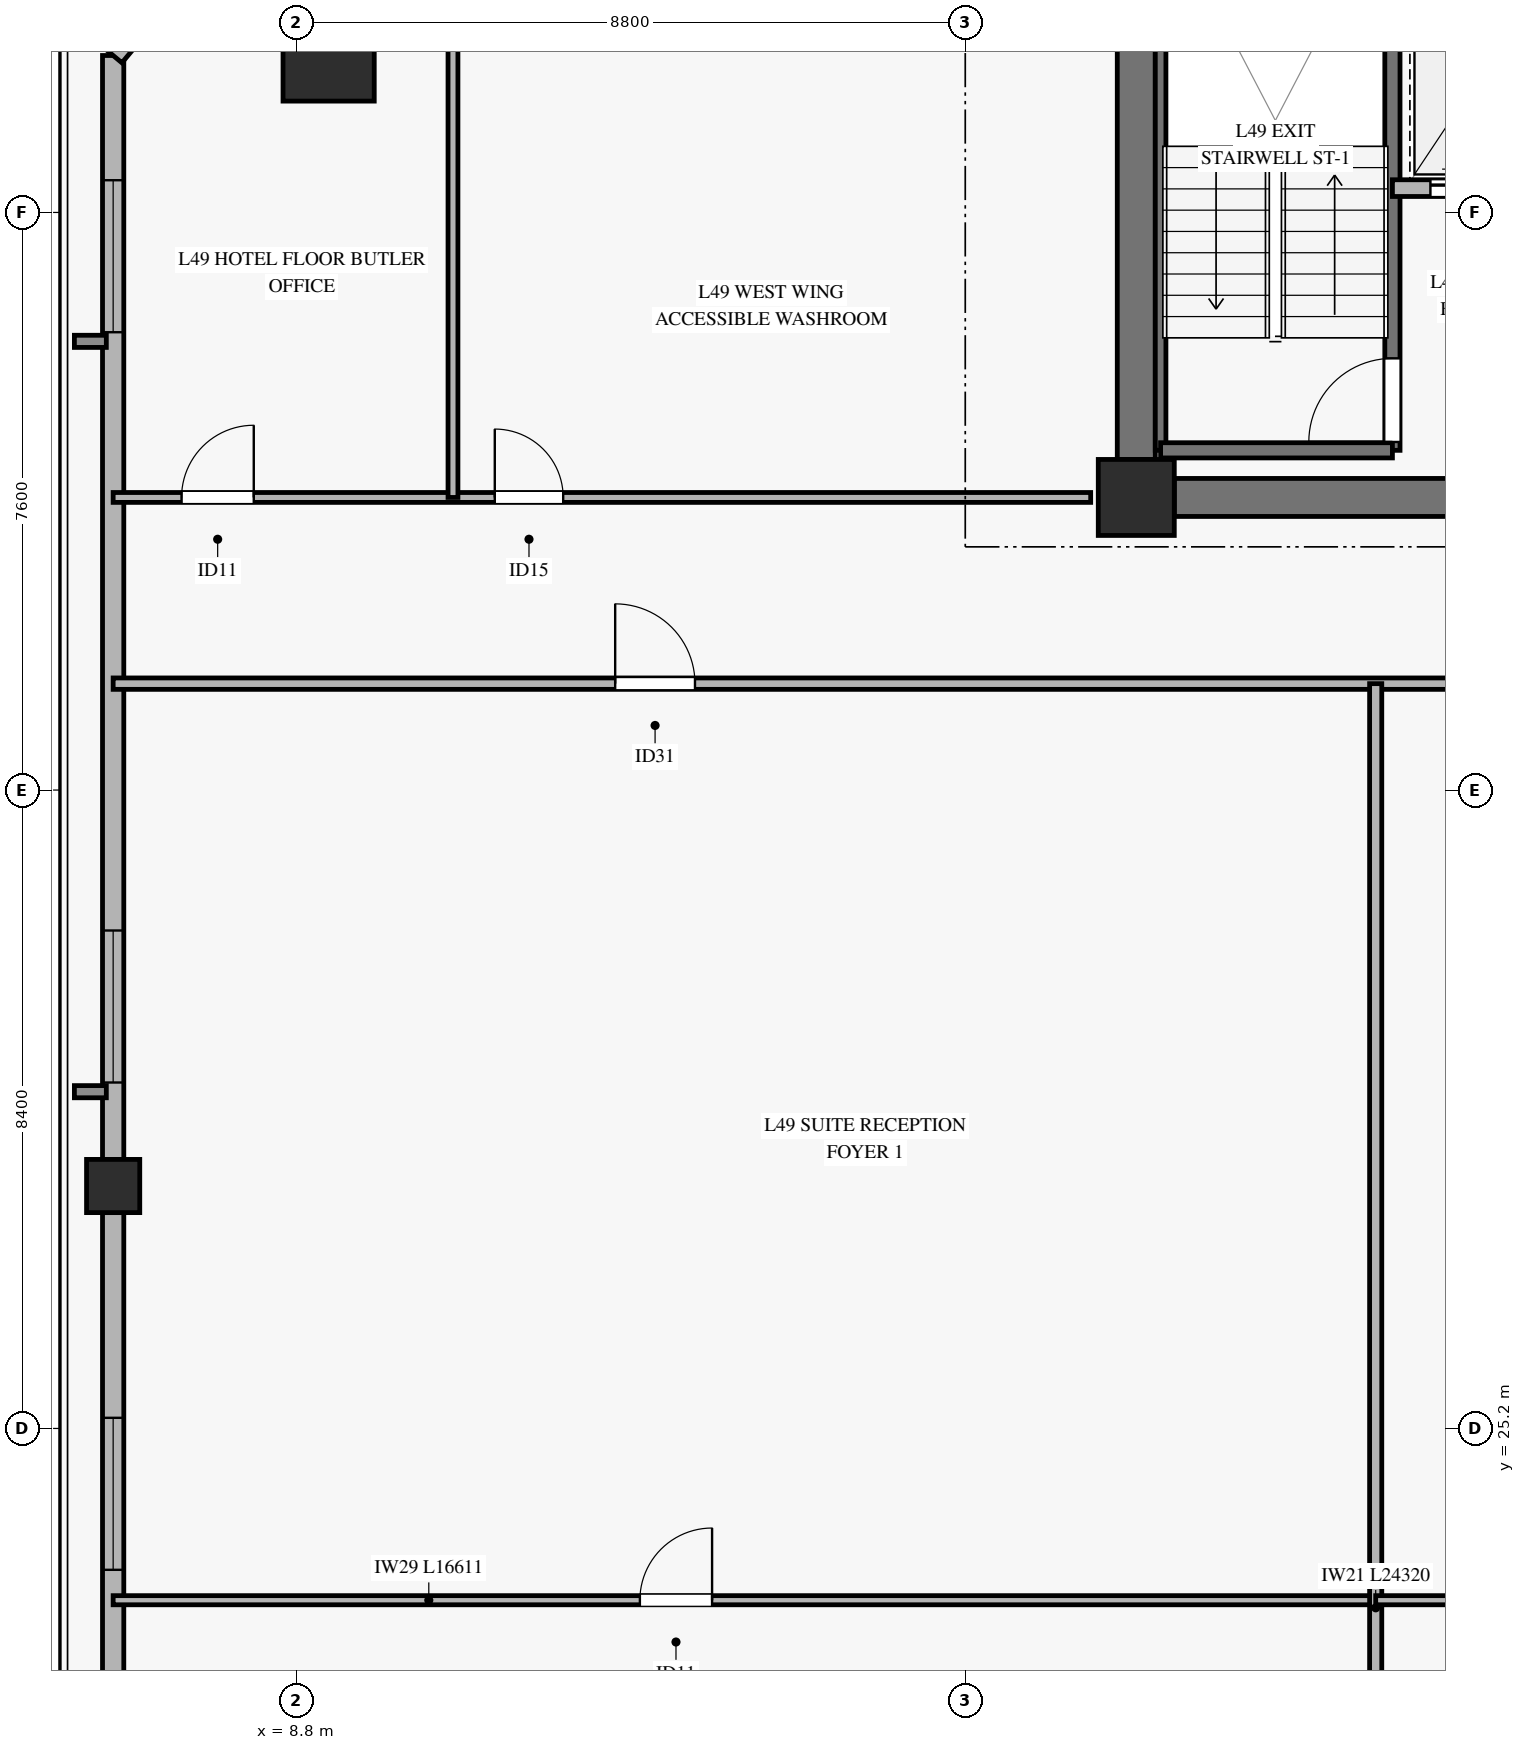
"""IFC4 building model, lengths in metres.
Left out: names, types, materials, properties, quantities, classifications, styles, units other than length and angle.
Written with IfcOpenShell. Run it as: python <this file> out.ifc"""

import sys

from ifc_helpers import new_model, si_unit, direction, frame, frame_2d, origin, origin_2d, place, context, subcontext, project, spatial, rectangle, hollow_rectangle, extrude, source, transform, mapped, element, fill, save


model = new_model("IFC4")
c1 = context("Model", 3, precision=1e-05, world=origin(), true_north=direction((0.0, 1.0)))
c2 = subcontext(c1, "Body", "Model", "MODEL_VIEW")
j1 = project(units=[si_unit("LENGTHUNIT", "METRE"), si_unit("PLANEANGLEUNIT", "RADIAN")], contexts=[c1])
p1 = place(None, origin())
s1 = spatial("IfcSite", under=j1, at=p1, CompositionType="ELEMENT")
p2 = place(p1, origin())
s2 = spatial("IfcBuilding", under=s1, at=p2, CompositionType="ELEMENT")
p3 = place(p2, frame((0.0, 0.0, 195.7)))
s3 = spatial("IfcBuildingStorey", under=s2, at=p3, CompositionType="ELEMENT", Elevation=195.7)
m1 = source(origin(), c2, "Body", "SweptSolid", [
    extrude(rectangle(XDim=1.0, YDim=1.0, at=origin_2d()), origin(), (0.0, 0.0, 1.0), 3.27),
])
p4 = place(p3, frame((19.85, 37.45, 0.0), z_axis=(0.0, 0.0, 1.0), x_axis=(1.0, 0.0, 0.0)))
e1 = element("IfcColumn", 1, at=p4, inside=s3, PredefinedType="PILASTER", context=c2, shape_type="MappedRepresentation", body=[
    mapped(m1, transform((0.0, 0.0, 0.0), x_axis=(1.0, 0.0, 0.0), y_axis=(0.0, 1.0, 0.0), z_axis=(0.0, 0.0, 1.0), scale=1.0)),
])
p5 = place(p3, frame((20.35, 37.45, 0.0), z_axis=(0.0, 0.0, 1.0), x_axis=(1.0, 0.0, 0.0)))
e2 = element("IfcWall", 2, at=p5, inside=s3, PredefinedType="SHEAR", context=c2, shape_type="SweptSolid", body=[
    extrude(rectangle(XDim=9.95, YDim=0.5, at=frame_2d((4.975, 0.0))), origin(), (0.0, 0.0, 1.0), 3.27),
])
p6 = place(p5, frame((4.2, 0.0, 0.0)))
e3 = element("IfcOpeningElement", 3, at=p6, cuts=e2, PredefinedType="OPENING", context=c2, shape_type="SweptSolid", body=[
    extrude(rectangle(XDim=1.2, YDim=2.15, at=frame_2d((0.6, 1.075))), frame((0.0, 0.26, 0.0), z_axis=(0.0, -1.0, 0.0), x_axis=(1.0, 0.0, 0.0)), (0.0, 0.0, 1.0), 0.52),
])
p7 = place(p3, frame((19.85, 37.95, 0.0), z_axis=(0.0, 0.0, 1.0), x_axis=(0.0, 1.0, 0.0)))
e4 = element("IfcWall", 4, at=p7, inside=s3, PredefinedType="SHEAR", context=c2, shape_type="SweptSolid", body=[
    extrude(rectangle(XDim=8.1, YDim=0.5, at=frame_2d((4.05, 0.0))), origin(), (0.0, 0.0, 1.0), 3.27),
])
m2 = source(origin(), c2, "Body", "SweptSolid", [
    extrude(hollow_rectangle(XDim=1.2, YDim=1.2, WallThickness=0.055, at=origin_2d()), origin(), (0.0, 0.0, 1.0), 3.27),
])
p8 = place(p3, frame((9.224, 43.265, 0.0), z_axis=(0.0, 0.0, 1.0), x_axis=(1.0, 0.0, 0.0)))
e5 = element("IfcColumn", 5, at=p8, inside=s3, PredefinedType="COLUMN", context=c2, shape_type="MappedRepresentation", body=[
    mapped(m2, transform((0.0, 0.0, 0.0), x_axis=(1.0, 0.0, 0.0), y_axis=(0.0, 1.0, 0.0), z_axis=(0.0, 0.0, 1.0), scale=1.0)),
])
m3 = source(origin(), c2, "Body", "SweptSolid", [
    extrude(hollow_rectangle(XDim=0.7, YDim=0.7, WallThickness=0.032, at=origin_2d()), origin(), (0.0, 0.0, 1.0), 3.27),
])
p9 = place(p3, frame((6.389, 28.39, 0.0), z_axis=(0.0, 0.0, 1.0), x_axis=(1.0, 0.0, 0.0)))
e6 = element("IfcColumn", 6, at=p9, inside=s3, PredefinedType="COLUMN", context=c2, shape_type="MappedRepresentation", body=[
    mapped(m3, transform((0.0, 0.0, 0.0), x_axis=(1.0, 0.0, 0.0), y_axis=(0.0, 1.0, 0.0), z_axis=(0.0, 0.0, 1.0), scale=1.0)),
])
p10 = place(p3, frame((6.389, 13.515, 0.0), z_axis=(0.0, 0.0, 1.0), x_axis=(0.0, 1.0, 0.0)))
e7 = element("IfcWall", 7, at=p10, inside=s3, PredefinedType="SOLIDWALL", context=c2, shape_type="SweptSolid", body=[
    extrude(rectangle(XDim=14.525, YDim=0.28, at=frame_2d((7.263, 0.0))), origin(), (0.0, 0.0, 1.0), 2.75),
])
p11 = place(p10, frame((3.017, 0.0, 0.45)))
e8 = element("IfcOpeningElement", 8, at=p11, cuts=e7, PredefinedType="OPENING", context=c2, shape_type="SweptSolid", body=[
    extrude(rectangle(XDim=2.0, YDim=2.0, at=frame_2d((1.0, 1.0))), frame((0.0, 0.15, 0.0), z_axis=(0.0, -1.0, 0.0), x_axis=(1.0, 0.0, 0.0)), (0.0, 0.0, 1.0), 0.3),
])
p12 = place(p10, frame((9.825, 0.0, 0.45)))
e9 = element("IfcOpeningElement", 9, at=p12, cuts=e7, PredefinedType="OPENING", context=c2, shape_type="SweptSolid", body=[
    extrude(rectangle(XDim=2.0, YDim=2.0, at=frame_2d((1.0, 1.0))), frame((0.0, 0.15, 0.0), z_axis=(0.0, -1.0, 0.0), x_axis=(1.0, 0.0, 0.0)), (0.0, 0.0, 1.0), 0.3),
])
p13 = place(p3, frame((6.389, 28.74, 0.0), z_axis=(0.0, 0.0, 1.0), x_axis=(0.0, 1.0, 0.0)))
e10 = element("IfcWall", 10, at=p13, inside=s3, PredefinedType="SOLIDWALL", context=c2, shape_type="SweptSolid", body=[
    extrude(rectangle(XDim=14.525, YDim=0.28, at=frame_2d((7.262, 0.0))), origin(), (0.0, 0.0, 1.0), 2.75),
])
p14 = place(p13, frame((1.012, 0.0, 0.45)))
e11 = element("IfcOpeningElement", 11, at=p14, cuts=e10, PredefinedType="OPENING", context=c2, shape_type="SweptSolid", body=[
    extrude(rectangle(XDim=2.0, YDim=2.0, at=frame_2d((1.0, 1.0))), frame((0.0, 0.15, 0.0), z_axis=(0.0, -1.0, 0.0), x_axis=(1.0, 0.0, 0.0)), (0.0, 0.0, 1.0), 0.3),
])
p15 = place(p13, frame((10.884, 0.0, 0.45)))
e12 = element("IfcOpeningElement", 12, at=p15, cuts=e10, PredefinedType="OPENING", context=c2, shape_type="SweptSolid", body=[
    extrude(rectangle(XDim=2.0, YDim=2.0, at=frame_2d((1.0, 1.0))), frame((0.0, 0.15, 0.0), z_axis=(0.0, -1.0, 0.0), x_axis=(1.0, 0.0, 0.0)), (0.0, 0.0, 1.0), 0.3),
])
p16 = place(p3, frame((8.874, 46.25, 0.0), z_axis=(0.0, 0.0, 1.0), x_axis=(-0.639807188901, -0.768535465044, 0.0)))
e13 = element("IfcWall", 13, at=p16, inside=s3, PredefinedType="SOLIDWALL", context=c2, shape_type="SweptSolid", body=[
    extrude(rectangle(XDim=3.884, YDim=0.3, at=frame_2d((1.942, 0.0))), origin(), (0.0, 0.0, 1.0), 2.75),
])
p17 = place(p16, frame((1.142, 0.0, 0.45)))
e14 = element("IfcOpeningElement", 14, at=p17, cuts=e13, PredefinedType="OPENING", context=c2, shape_type="SweptSolid", body=[
    extrude(rectangle(XDim=1.6, YDim=2.0, at=frame_2d((0.8, 1.0))), frame((0.0, 0.16, 0.0), z_axis=(0.0, -1.0, 0.0), x_axis=(1.0, 0.0, 0.0)), (0.0, 0.0, 1.0), 0.32),
])
p18 = place(p3, frame((20.17, 38.07, 0.0), z_axis=(0.0, 0.0, 1.0), x_axis=(0.0, 1.0, 0.0)))
e15 = element("IfcWall", 15, at=p18, inside=s3, PredefinedType="SOLIDWALL", context=c2, shape_type="SweptSolid", body=[
    extrude(rectangle(XDim=7.25, YDim=0.14, at=frame_2d((3.625, 0.0))), origin(), (0.0, 0.0, 1.0), 3.5),
])
p19 = place(p3, frame((23.22, 38.07, 0.0), z_axis=(0.0, 0.0, 1.0), x_axis=(0.0, 1.0, 0.0)))
e16 = element("IfcWall", 16, at=p19, inside=s3, PredefinedType="SOLIDWALL", context=c2, shape_type="SweptSolid", body=[
    extrude(rectangle(XDim=7.25, YDim=0.2, at=frame_2d((3.625, 0.0))), origin(), (0.0, 0.0, 1.0), 3.5),
])
p20 = place(p19, frame((0.11, 0.0, 0.0)))
e17 = element("IfcOpeningElement", 17, at=p20, cuts=e16, PredefinedType="OPENING", context=c2, shape_type="SweptSolid", body=[
    extrude(rectangle(XDim=1.1, YDim=2.15, at=frame_2d((0.55, 1.075))), frame((0.0, 0.11, 0.0), z_axis=(0.0, -1.0, 0.0), x_axis=(1.0, 0.0, 0.0)), (0.0, 0.0, 1.0), 0.22),
])
p21 = place(p3, frame((20.17, 38.07, 0.0), z_axis=(0.0, 0.0, 1.0), x_axis=(1.0, 0.0, 0.0)))
e18 = element("IfcWall", 18, at=p21, inside=s3, PredefinedType="SOLIDWALL", context=c2, shape_type="SweptSolid", body=[
    extrude(rectangle(XDim=3.05, YDim=0.2, at=frame_2d((1.525, 0.0))), origin(), (0.0, 0.0, 1.0), 3.5),
])
p22 = place(p3, frame((23.22, 41.52, 0.0), z_axis=(0.0, 0.0, 1.0), x_axis=(1.0, 0.0, 0.0)))
e19 = element("IfcWall", 19, at=p22, inside=s3, PredefinedType="SOLIDWALL", context=c2, shape_type="SweptSolid", body=[
    extrude(rectangle(XDim=3.92, YDim=0.22, at=frame_2d((1.96, 0.0))), origin(), (0.0, 0.0, 1.0), 3.27),
])
p23 = place(p22, frame((0.5, 0.0, 0.0)))
e20 = element("IfcOpeningElement", 20, at=p23, cuts=e19, PredefinedType="OPENING", context=c2, shape_type="SweptSolid", body=[
    extrude(rectangle(XDim=1.1, YDim=2.2, at=frame_2d((0.55, 1.1))), frame((0.0, 0.12, 0.0), z_axis=(0.0, -1.0, 0.0), x_axis=(1.0, 0.0, 0.0)), (0.0, 0.0, 1.0), 0.24),
])
p24 = place(p22, frame((2.4, 0.0, 0.0)))
e21 = element("IfcOpeningElement", 21, at=p24, cuts=e19, PredefinedType="OPENING", context=c2, shape_type="SweptSolid", body=[
    extrude(rectangle(XDim=1.1, YDim=2.2, at=frame_2d((0.55, 1.1))), frame((0.0, 0.12, 0.0), z_axis=(0.0, -1.0, 0.0), x_axis=(1.0, 0.0, 0.0)), (0.0, 0.0, 1.0), 0.24),
])
p25 = place(p3, frame((6.389, 35.0, 0.0), z_axis=(0.0, 0.0, 1.0), x_axis=(1.0, 0.0, 0.0)))
e22 = element("IfcWall", 22, at=p25, inside=s3, PredefinedType="PARTITIONING", context=c2, shape_type="SweptSolid", body=[
    extrude(rectangle(XDim=57.623, YDim=0.15, at=frame_2d((28.812, 0.0))), origin(), (0.0, 0.0, 1.0), 2.455),
])
p26 = place(p25, frame((6.605, 0.0, 0.0)))
e23 = element("IfcOpeningElement", 23, at=p26, cuts=e22, PredefinedType="OPENING", context=c2, shape_type="SweptSolid", body=[
    extrude(rectangle(XDim=1.05, YDim=2.15, at=frame_2d((0.525, 1.075))), frame((0.0, 0.085, 0.0), z_axis=(0.0, -1.0, 0.0), x_axis=(1.0, 0.0, 0.0)), (0.0, 0.0, 1.0), 0.17),
])
p27 = place(p25, frame((19.288, 0.0, 0.0)))
e24 = element("IfcOpeningElement", 24, at=p27, cuts=e22, PredefinedType="OPENING", context=c2, shape_type="SweptSolid", body=[
    extrude(rectangle(XDim=1.05, YDim=2.15, at=frame_2d((0.525, 1.075))), frame((0.0, 0.085, 0.0), z_axis=(0.0, -1.0, 0.0), x_axis=(1.0, 0.0, 0.0)), (0.0, 0.0, 1.0), 0.17),
])
p28 = place(p25, frame((25.888, 0.0, 0.0)))
e25 = element("IfcOpeningElement", 25, at=p28, cuts=e22, PredefinedType="OPENING", context=c2, shape_type="SweptSolid", body=[
    extrude(rectangle(XDim=1.05, YDim=2.15, at=frame_2d((0.525, 1.075))), frame((0.0, 0.085, 0.0), z_axis=(0.0, -1.0, 0.0), x_axis=(1.0, 0.0, 0.0)), (0.0, 0.0, 1.0), 0.17),
])
p29 = place(p25, frame((32.381, 0.0, 0.0)))
e26 = element("IfcOpeningElement", 26, at=p29, cuts=e22, PredefinedType="OPENING", context=c2, shape_type="SweptSolid", body=[
    extrude(rectangle(XDim=1.05, YDim=2.15, at=frame_2d((0.525, 1.075))), frame((0.0, 0.085, 0.0), z_axis=(0.0, -1.0, 0.0), x_axis=(1.0, 0.0, 0.0)), (0.0, 0.0, 1.0), 0.17),
])
p30 = place(p25, frame((44.565, 0.0, 0.0)))
e27 = element("IfcOpeningElement", 27, at=p30, cuts=e22, PredefinedType="OPENING", context=c2, shape_type="SweptSolid", body=[
    extrude(rectangle(XDim=1.05, YDim=2.15, at=frame_2d((0.525, 1.075))), frame((0.0, 0.085, 0.0), z_axis=(0.0, -1.0, 0.0), x_axis=(1.0, 0.0, 0.0)), (0.0, 0.0, 1.0), 0.17),
])
p31 = place(p3, frame((6.389, 22.94, 0.0), z_axis=(0.0, 0.0, 1.0), x_axis=(1.0, 0.0, 0.0)))
e28 = element("IfcWall", 28, at=p31, inside=s3, PredefinedType="PARTITIONING", context=c2, shape_type="SweptSolid", body=[
    extrude(rectangle(XDim=16.611, YDim=0.12, at=frame_2d((8.306, 0.0))), origin(), (0.0, 0.0, 1.0), 2.455),
])
p32 = place(p31, frame((6.93, 0.0, 0.0)))
e29 = element("IfcOpeningElement", 29, at=p32, cuts=e28, PredefinedType="OPENING", context=c2, shape_type="SweptSolid", body=[
    extrude(rectangle(XDim=0.95, YDim=2.1, at=frame_2d((0.475, 1.05))), frame((0.0, 0.07, 0.0), z_axis=(0.0, -1.0, 0.0), x_axis=(1.0, 0.0, 0.0)), (0.0, 0.0, 1.0), 0.14),
])
p33 = place(p3, frame((23.0, 10.68, 0.0), z_axis=(0.0, 0.0, 1.0), x_axis=(0.0, 1.0, 0.0)))
e30 = element("IfcWall", 30, at=p33, inside=s3, PredefinedType="PARTITIONING", context=c2, shape_type="SweptSolid", body=[
    extrude(rectangle(XDim=24.32, YDim=0.16, at=frame_2d((12.16, 0.0))), origin(), (0.0, 0.0, 1.0), 2.755),
])
p34 = place(p3, frame((23.0, 22.94, 0.0), z_axis=(0.0, 0.0, 1.0), x_axis=(1.0, 0.0, 0.0)))
e31 = element("IfcWall", 31, at=p34, inside=s3, PredefinedType="PARTITIONING", context=c2, shape_type="SweptSolid", body=[
    extrude(rectangle(XDim=6.6, YDim=0.12, at=frame_2d((3.3, 0.0))), origin(), (0.0, 0.0, 1.0), 3.27),
])
p35 = place(p34, frame((2.806, 0.0, 0.0)))
e32 = element("IfcOpeningElement", 32, at=p35, cuts=e31, PredefinedType="OPENING", context=c2, shape_type="SweptSolid", body=[
    extrude(rectangle(XDim=0.95, YDim=2.1, at=frame_2d((0.475, 1.05))), frame((0.0, 0.07, 0.0), z_axis=(0.0, -1.0, 0.0), x_axis=(1.0, 0.0, 0.0)), (0.0, 0.0, 1.0), 0.14),
])
p36 = place(p3, frame((6.389, 37.45, 0.0), z_axis=(0.0, 0.0, 1.0), x_axis=(1.0, 0.0, 0.0)))
e33 = element("IfcWall", 33, at=p36, inside=s3, PredefinedType="PARTITIONING", context=c2, shape_type="SweptSolid", body=[
    extrude(rectangle(XDim=12.861, YDim=0.13, at=frame_2d((6.431, 0.0))), origin(), (0.0, 0.0, 1.0), 2.755),
])
p37 = place(p36, frame((0.9, 0.0, 0.0)))
e34 = element("IfcOpeningElement", 34, at=p37, cuts=e33, PredefinedType="OPENING", context=c2, shape_type="SweptSolid", body=[
    extrude(rectangle(XDim=0.95, YDim=2.1, at=frame_2d((0.475, 1.05))), frame((0.0, 0.075, 0.0), z_axis=(0.0, -1.0, 0.0), x_axis=(1.0, 0.0, 0.0)), (0.0, 0.0, 1.0), 0.15),
])
p38 = place(p36, frame((5.021, 0.0, 0.0)))
e35 = element("IfcOpeningElement", 35, at=p38, cuts=e33, PredefinedType="OPENING", context=c2, shape_type="SweptSolid", body=[
    extrude(rectangle(XDim=0.9, YDim=2.1, at=frame_2d((0.45, 1.05))), frame((0.0, 0.075, 0.0), z_axis=(0.0, -1.0, 0.0), x_axis=(1.0, 0.0, 0.0)), (0.0, 0.0, 1.0), 0.15),
])
p39 = place(p3, frame((10.86, 37.45, 0.0), z_axis=(0.0, 0.0, 1.0), x_axis=(0.0, 1.0, 0.0)))
e36 = element("IfcWall", 36, at=p39, inside=s3, PredefinedType="PARTITIONING", context=c2, shape_type="SweptSolid", body=[
    extrude(rectangle(XDim=8.8, YDim=0.13, at=frame_2d((4.4, 0.0))), origin(), (0.0, 0.0, 1.0), 3.27),
])
m4 = source(origin(), c2, "Body", "SweptSolid", [
    extrude(rectangle(XDim=2.0, YDim=2.0, at=frame_2d((1.0, 1.0))), frame((0.0, 0.03, 0.0), z_axis=(0.0, -1.0, 0.0), x_axis=(1.0, 0.0, 0.0)), (0.0, 0.0, 1.0), 0.06),
])
p40 = place(p12, origin())
e37 = element("IfcWindow", 37, at=p40, inside=s3, PartitioningType="SINGLE_PANEL", PredefinedType="WINDOW", context=c2, shape_type="MappedRepresentation", body=[
    mapped(m4, transform((0.0, 0.0, 0.0), x_axis=(1.0, 0.0, 0.0), y_axis=(0.0, 1.0, 0.0), z_axis=(0.0, 0.0, 1.0), scale=1.0)),
])
fill(e9, e37)
p41 = place(p14, origin())
e38 = element("IfcWindow", 38, at=p41, inside=s3, PartitioningType="SINGLE_PANEL", PredefinedType="WINDOW", context=c2, shape_type="MappedRepresentation", body=[
    mapped(m4, transform((0.0, 0.0, 0.0), x_axis=(1.0, 0.0, 0.0), y_axis=(0.0, 1.0, 0.0), z_axis=(0.0, 0.0, 1.0), scale=1.0)),
])
fill(e11, e38)
p42 = place(p15, origin())
e39 = element("IfcWindow", 39, at=p42, inside=s3, PartitioningType="SINGLE_PANEL", PredefinedType="WINDOW", context=c2, shape_type="MappedRepresentation", body=[
    mapped(m4, transform((0.0, 0.0, 0.0), x_axis=(1.0, 0.0, 0.0), y_axis=(0.0, 1.0, 0.0), z_axis=(0.0, 0.0, 1.0), scale=1.0)),
])
fill(e12, e39)
m5 = source(origin(), c2, "Body", "SweptSolid", [
    extrude(rectangle(XDim=1.1, YDim=2.15, at=frame_2d((0.55, 1.075))), frame((0.0, 0.025, 0.0), z_axis=(0.0, -1.0, 0.0), x_axis=(1.0, 0.0, 0.0)), (0.0, 0.0, 1.0), 0.05),
])
p43 = place(p20, origin())
e40 = element("IfcDoor", 40, at=p43, inside=s3, OperationType="SINGLE_SWING_LEFT", PredefinedType="DOOR", context=c2, shape_type="MappedRepresentation", body=[
    mapped(m5, transform((0.0, 0.0, 0.0), x_axis=(1.0, 0.0, 0.0), y_axis=(0.0, 1.0, 0.0), z_axis=(0.0, 0.0, 1.0), scale=1.0)),
])
fill(e17, e40)
m6 = source(origin(), c2, "Body", "SweptSolid", [
    extrude(rectangle(XDim=1.1, YDim=2.2, at=frame_2d((0.55, 1.1))), frame((0.0, 0.025, 0.0), z_axis=(0.0, -1.0, 0.0), x_axis=(1.0, 0.0, 0.0)), (0.0, 0.0, 1.0), 0.05),
])
p44 = place(p23, origin())
e41 = element("IfcDoor", 41, at=p44, inside=s3, OperationType="SLIDING_TO_LEFT", PredefinedType="DOOR", context=c2, shape_type="MappedRepresentation", body=[
    mapped(m6, transform((0.0, 0.0, 0.0), x_axis=(1.0, 0.0, 0.0), y_axis=(0.0, 1.0, 0.0), z_axis=(0.0, 0.0, 1.0), scale=1.0)),
])
fill(e20, e41)
m7 = source(origin(), c2, "Body", "SweptSolid", [
    extrude(rectangle(XDim=1.05, YDim=2.15, at=frame_2d((0.525, 1.075))), frame((0.0, 0.025, 0.0), z_axis=(0.0, -1.0, 0.0), x_axis=(1.0, 0.0, 0.0)), (0.0, 0.0, 1.0), 0.05),
])
p45 = place(p26, origin())
e42 = element("IfcDoor", 42, at=p45, inside=s3, OperationType="SINGLE_SWING_LEFT", PredefinedType="DOOR", context=c2, shape_type="MappedRepresentation", body=[
    mapped(m7, transform((0.0, 0.0, 0.0), x_axis=(1.0, 0.0, 0.0), y_axis=(0.0, 1.0, 0.0), z_axis=(0.0, 0.0, 1.0), scale=1.0)),
])
fill(e23, e42)
m8 = source(origin(), c2, "Body", "SweptSolid", [
    extrude(rectangle(XDim=0.95, YDim=2.1, at=frame_2d((0.475, 1.05))), frame((0.0, 0.025, 0.0), z_axis=(0.0, -1.0, 0.0), x_axis=(1.0, 0.0, 0.0)), (0.0, 0.0, 1.0), 0.05),
])
p46 = place(p32, origin())
e43 = element("IfcDoor", 43, at=p46, inside=s3, OperationType="SINGLE_SWING_RIGHT", PredefinedType="DOOR", context=c2, shape_type="MappedRepresentation", body=[
    mapped(m8, transform((0.0, 0.0, 0.0), x_axis=(1.0, 0.0, 0.0), y_axis=(0.0, 1.0, 0.0), z_axis=(0.0, 0.0, 1.0), scale=1.0)),
])
fill(e29, e43)
p47 = place(p37, origin())
e44 = element("IfcDoor", 44, at=p47, inside=s3, OperationType="SINGLE_SWING_RIGHT", PredefinedType="DOOR", context=c2, shape_type="MappedRepresentation", body=[
    mapped(m8, transform((0.0, 0.0, 0.0), x_axis=(1.0, 0.0, 0.0), y_axis=(0.0, 1.0, 0.0), z_axis=(0.0, 0.0, 1.0), scale=1.0)),
])
fill(e34, e44)
m9 = source(origin(), c2, "Body", "SweptSolid", [
    extrude(rectangle(XDim=0.9, YDim=2.1, at=frame_2d((0.45, 1.05))), frame((0.0, 0.025, 0.0), z_axis=(0.0, -1.0, 0.0), x_axis=(1.0, 0.0, 0.0)), (0.0, 0.0, 1.0), 0.05),
])
p48 = place(p38, origin())
e45 = element("IfcDoor", 45, at=p48, inside=s3, OperationType="SINGLE_SWING_LEFT", PredefinedType="DOOR", context=c2, shape_type="MappedRepresentation", body=[
    mapped(m9, transform((0.0, 0.0, 0.0), x_axis=(1.0, 0.0, 0.0), y_axis=(0.0, 1.0, 0.0), z_axis=(0.0, 0.0, 1.0), scale=1.0)),
])
fill(e35, e45)
save(model, sys.argv[1])
